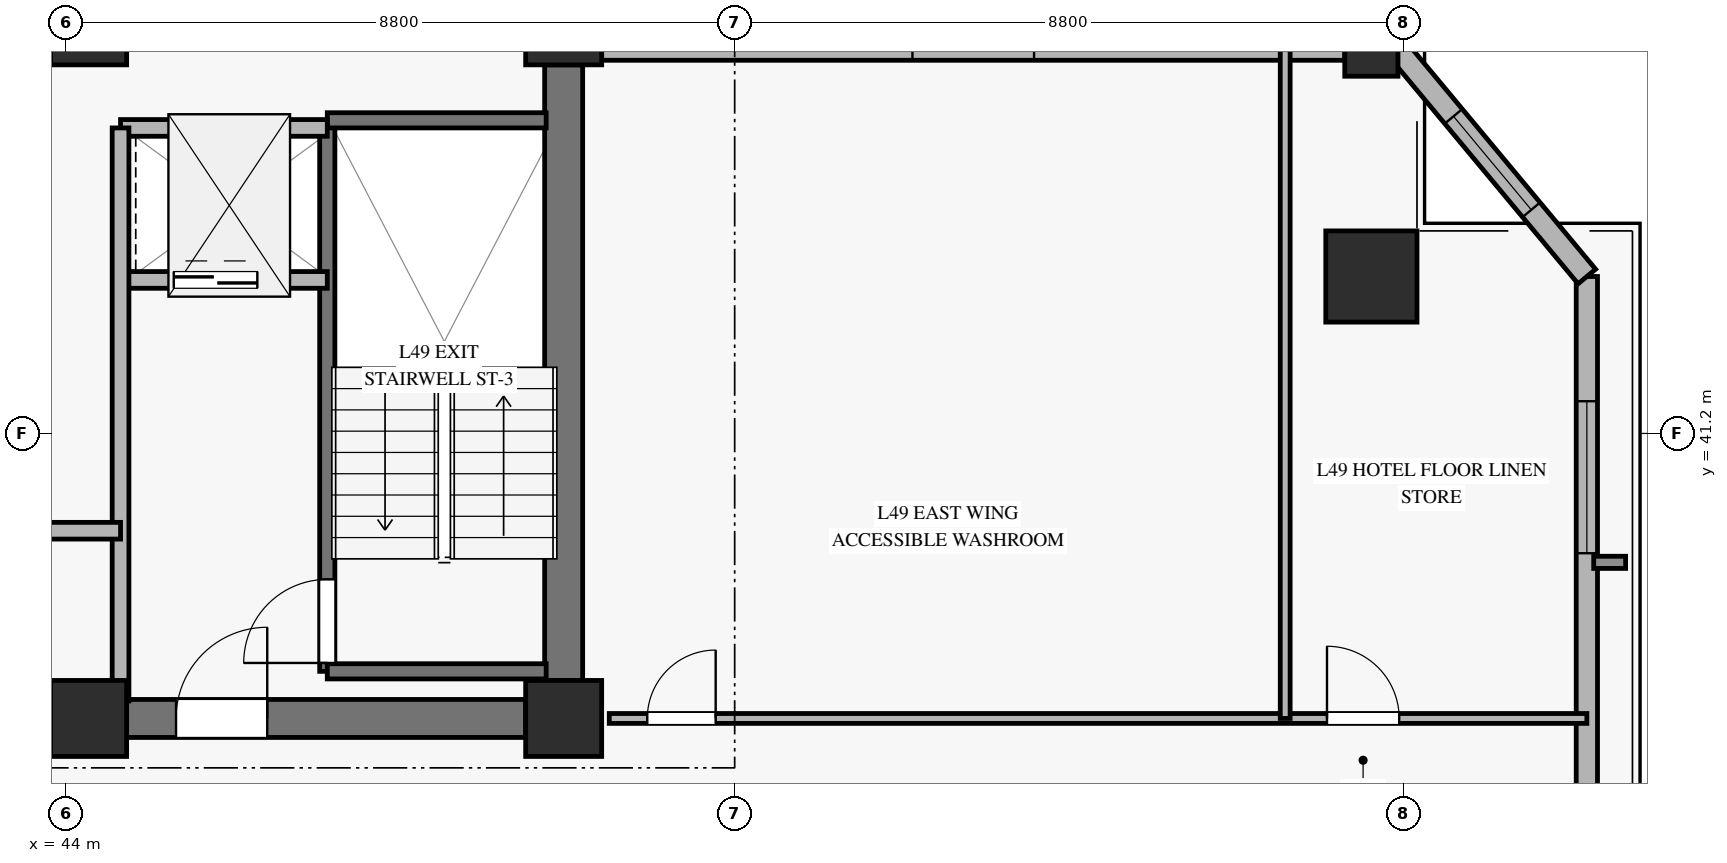
"""IFC4 building model, lengths in metres.
Left out: names, types, materials, properties, quantities, classifications, styles, units other than length and angle.
Written with IfcOpenShell. Run it as: python <this file> out.ifc"""

import sys

from ifc_helpers import new_model, si_unit, direction, frame, frame_2d, origin, origin_2d, place, context, subcontext, project, spatial, rectangle, hollow_rectangle, extrude, source, transform, mapped, element, fill, save


model = new_model("IFC4")
c1 = context("Model", 3, precision=1e-05, world=origin(), true_north=direction((0.0, 1.0)))
c2 = subcontext(c1, "Body", "Model", "MODEL_VIEW")
j1 = project(units=[si_unit("LENGTHUNIT", "METRE"), si_unit("PLANEANGLEUNIT", "RADIAN")], contexts=[c1])
p1 = place(None, origin())
s1 = spatial("IfcSite", under=j1, at=p1, CompositionType="ELEMENT")
p2 = place(p1, origin())
s2 = spatial("IfcBuilding", under=s1, at=p2, CompositionType="ELEMENT")
p3 = place(p2, frame((0.0, 0.0, 195.7)))
s3 = spatial("IfcBuildingStorey", under=s2, at=p3, CompositionType="ELEMENT", Elevation=195.7)
m1 = source(origin(), c2, "Body", "SweptSolid", [
    extrude(rectangle(XDim=1.0, YDim=1.0, at=origin_2d()), origin(), (0.0, 0.0, 1.0), 3.27),
])
for number, where, z_axis, x_axis in (
    (1, (44.3, 37.45, 0.0), (0.0, 0.0, 1.0), (1.0, 0.0, 0.0)),
    (2, (44.3, 46.55, 0.0), (0.0, 0.0, 1.0), (1.0, 0.0, 0.0)),
    (3, (50.55, 37.45, 0.0), (0.0, 0.0, 1.0), (1.0, 0.0, 0.0)),
    (4, (50.55, 46.55, 0.0), (0.0, 0.0, 1.0), (1.0, 0.0, 0.0)),
):
    element("IfcColumn", number, at=place(p3, frame(where, z_axis=z_axis, x_axis=x_axis)), inside=s3, PredefinedType="PILASTER", context=c2, shape_type="MappedRepresentation", body=[
        mapped(m1, transform((0.0, 0.0, 0.0), x_axis=(1.0, 0.0, 0.0), y_axis=(0.0, 1.0, 0.0), z_axis=(0.0, 0.0, 1.0), scale=1.0)),
    ])
p4 = place(p3, frame((44.8, 37.45, 0.0), z_axis=(0.0, 0.0, 1.0), x_axis=(1.0, 0.0, 0.0)))
e5 = element("IfcWall", 5, at=p4, inside=s3, PredefinedType="SHEAR", context=c2, shape_type="SweptSolid", body=[
    extrude(rectangle(XDim=5.25, YDim=0.5, at=frame_2d((2.625, 0.0))), origin(), (0.0, 0.0, 1.0), 3.27),
])
p5 = place(p4, frame((0.65, 0.0, 0.0)))
e6 = element("IfcOpeningElement", 6, at=p5, cuts=e5, PredefinedType="OPENING", context=c2, shape_type="SweptSolid", body=[
    extrude(rectangle(XDim=1.2, YDim=2.15, at=frame_2d((0.6, 1.075))), frame((0.0, 0.26, 0.0), z_axis=(0.0, -1.0, 0.0), x_axis=(1.0, 0.0, 0.0)), (0.0, 0.0, 1.0), 0.52),
])
p6 = place(p3, frame((50.55, 37.95, 0.0), z_axis=(0.0, 0.0, 1.0), x_axis=(0.0, 1.0, 0.0)))
e7 = element("IfcWall", 7, at=p6, inside=s3, PredefinedType="SHEAR", context=c2, shape_type="SweptSolid", body=[
    extrude(rectangle(XDim=8.1, YDim=0.5, at=frame_2d((4.05, 0.0))), origin(), (0.0, 0.0, 1.0), 3.27),
])
m2 = source(origin(), c2, "Body", "SweptSolid", [
    extrude(hollow_rectangle(XDim=1.2, YDim=1.2, WallThickness=0.055, at=origin_2d()), origin(), (0.0, 0.0, 1.0), 3.27),
])
p7 = place(p3, frame((61.177, 43.265, 0.0), z_axis=(0.0, 0.0, 1.0), x_axis=(1.0, 0.0, 0.0)))
e8 = element("IfcColumn", 8, at=p7, inside=s3, PredefinedType="COLUMN", context=c2, shape_type="MappedRepresentation", body=[
    mapped(m2, transform((0.0, 0.0, 0.0), x_axis=(1.0, 0.0, 0.0), y_axis=(0.0, 1.0, 0.0), z_axis=(0.0, 0.0, 1.0), scale=1.0)),
])
m3 = source(origin(), c2, "Body", "SweptSolid", [
    extrude(hollow_rectangle(XDim=0.7, YDim=0.7, WallThickness=0.032, at=origin_2d()), origin(), (0.0, 0.0, 1.0), 3.27),
])
p8 = place(p3, frame((61.177, 46.25, 0.0), z_axis=(0.0, 0.0, 1.0), x_axis=(1.0, 0.0, 0.0)))
e9 = element("IfcColumn", 9, at=p8, inside=s3, PredefinedType="COLUMN", context=c2, shape_type="MappedRepresentation", body=[
    mapped(m3, transform((0.0, 0.0, 0.0), x_axis=(1.0, 0.0, 0.0), y_axis=(0.0, 1.0, 0.0), z_axis=(0.0, 0.0, 1.0), scale=1.0)),
])
p9 = place(p3, frame((64.012, 28.74, 0.0), z_axis=(0.0, 0.0, 1.0), x_axis=(0.0, 1.0, 0.0)))
e10 = element("IfcWall", 10, at=p9, inside=s3, PredefinedType="SOLIDWALL", context=c2, shape_type="SweptSolid", body=[
    extrude(rectangle(XDim=14.525, YDim=0.28, at=frame_2d((7.262, 0.0))), origin(), (0.0, 0.0, 1.0), 2.75),
])
p10 = place(p9, frame((1.012, 0.0, 0.45)))
e11 = element("IfcOpeningElement", 11, at=p10, cuts=e10, PredefinedType="OPENING", context=c2, shape_type="SweptSolid", body=[
    extrude(rectangle(XDim=2.0, YDim=2.0, at=frame_2d((1.0, 1.0))), frame((0.0, 0.15, 0.0), z_axis=(0.0, -1.0, 0.0), x_axis=(1.0, 0.0, 0.0)), (0.0, 0.0, 1.0), 0.3),
])
p11 = place(p9, frame((10.884, 0.0, 0.45)))
e12 = element("IfcOpeningElement", 12, at=p11, cuts=e10, PredefinedType="OPENING", context=c2, shape_type="SweptSolid", body=[
    extrude(rectangle(XDim=2.0, YDim=2.0, at=frame_2d((1.0, 1.0))), frame((0.0, 0.15, 0.0), z_axis=(0.0, -1.0, 0.0), x_axis=(1.0, 0.0, 0.0)), (0.0, 0.0, 1.0), 0.3),
])
p12 = place(p3, frame((51.05, 46.25, 0.0), z_axis=(0.0, 0.0, 1.0), x_axis=(1.0, 0.0, 0.0)))
e13 = element("IfcWall", 13, at=p12, inside=s3, PredefinedType="SOLIDWALL", context=c2, shape_type="SweptSolid", body=[
    extrude(rectangle(XDim=9.777, YDim=0.28, at=frame_2d((4.888, 0.0))), origin(), (0.0, 0.0, 1.0), 2.75),
])
p13 = place(p12, frame((4.089, 0.0, 0.45)))
e14 = element("IfcOpeningElement", 14, at=p13, cuts=e13, PredefinedType="OPENING", context=c2, shape_type="SweptSolid", body=[
    extrude(rectangle(XDim=1.6, YDim=2.0, at=frame_2d((0.8, 1.0))), frame((0.0, 0.15, 0.0), z_axis=(0.0, -1.0, 0.0), x_axis=(1.0, 0.0, 0.0)), (0.0, 0.0, 1.0), 0.3),
])
p14 = place(p3, frame((64.012, 43.265, 0.0), z_axis=(0.0, 0.0, 1.0), x_axis=(-0.639770061202, 0.768566372403, 0.0)))
e15 = element("IfcWall", 15, at=p14, inside=s3, PredefinedType="SOLIDWALL", context=c2, shape_type="SweptSolid", body=[
    extrude(rectangle(XDim=3.884, YDim=0.3, at=frame_2d((1.942, 0.0))), origin(), (0.0, 0.0, 1.0), 2.75),
])
p15 = place(p14, frame((1.142, 0.0, 0.45)))
e16 = element("IfcOpeningElement", 16, at=p15, cuts=e15, PredefinedType="OPENING", context=c2, shape_type="SweptSolid", body=[
    extrude(rectangle(XDim=1.6, YDim=2.0, at=frame_2d((0.8, 1.0))), frame((0.0, 0.16, 0.0), z_axis=(0.0, -1.0, 0.0), x_axis=(1.0, 0.0, 0.0)), (0.0, 0.0, 1.0), 0.32),
])
p16 = place(p3, frame((47.44, 38.07, 0.0), z_axis=(0.0, 0.0, 1.0), x_axis=(0.0, 1.0, 0.0)))
e17 = element("IfcWall", 17, at=p16, inside=s3, PredefinedType="SOLIDWALL", context=c2, shape_type="SweptSolid", body=[
    extrude(rectangle(XDim=7.25, YDim=0.2, at=frame_2d((3.625, 0.0))), origin(), (0.0, 0.0, 1.0), 3.5),
])
p17 = place(p16, frame((0.11, 0.0, 0.0)))
e18 = element("IfcOpeningElement", 18, at=p17, cuts=e17, PredefinedType="OPENING", context=c2, shape_type="SweptSolid", body=[
    extrude(rectangle(XDim=1.1, YDim=2.15, at=frame_2d((0.55, 1.075))), frame((0.0, 0.11, 0.0), z_axis=(0.0, -1.0, 0.0), x_axis=(1.0, 0.0, 0.0)), (0.0, 0.0, 1.0), 0.22),
])
for number, where, z_axis, x_axis in (
    (19, (47.44, 45.32, 0.0), (0.0, 0.0, 1.0), (1.0, 0.0, 0.0)),
    (20, (47.44, 38.07, 0.0), (0.0, 0.0, 1.0), (1.0, 0.0, 0.0)),
):
    element("IfcWall", number, at=place(p3, frame(where, z_axis=z_axis, x_axis=x_axis)), inside=s3, PredefinedType="SOLIDWALL", context=c2, shape_type="SweptSolid", body=[
        extrude(rectangle(XDim=2.88, YDim=0.2, at=frame_2d((1.44, 0.0))), origin(), (0.0, 0.0, 1.0), 3.5),
    ])
p18 = place(p3, frame((44.72, 43.22, 0.0), z_axis=(0.0, 0.0, 1.0), x_axis=(1.0, 0.0, 0.0)))
e21 = element("IfcWall", 21, at=p18, inside=s3, PredefinedType="SOLIDWALL", context=c2, shape_type="SweptSolid", body=[
    extrude(rectangle(XDim=2.72, YDim=0.22, at=frame_2d((1.36, 0.0))), origin(), (0.0, 0.0, 1.0), 3.27),
])
p19 = place(p18, frame((0.7, 0.0, 0.0)))
e22 = element("IfcOpeningElement", 22, at=p19, cuts=e21, PredefinedType="OPENING", context=c2, shape_type="SweptSolid", body=[
    extrude(rectangle(XDim=1.1, YDim=2.2, at=frame_2d((0.55, 1.1))), frame((0.0, 0.12, 0.0), z_axis=(0.0, -1.0, 0.0), x_axis=(1.0, 0.0, 0.0)), (0.0, 0.0, 1.0), 0.24),
])
p20 = place(p3, frame((44.72, 45.22, 0.0), z_axis=(0.0, 0.0, 1.0), x_axis=(1.0, 0.0, 0.0)))
e23 = element("IfcWall", 23, at=p20, inside=s3, PredefinedType="SOLIDWALL", context=c2, shape_type="SweptSolid", body=[
    extrude(rectangle(XDim=2.72, YDim=0.22, at=frame_2d((1.36, 0.0))), origin(), (0.0, 0.0, 1.0), 3.27),
])
p21 = place(p3, frame((44.72, 37.68, 0.0), z_axis=(0.0, 0.0, 1.0), x_axis=(0.0, 1.0, 0.0)))
e24 = element("IfcWall", 24, at=p21, inside=s3, PredefinedType="SOLIDWALL", context=c2, shape_type="SweptSolid", body=[
    extrude(rectangle(XDim=7.54, YDim=0.22, at=frame_2d((3.77, 0.0))), origin(), (0.0, 0.0, 1.0), 3.27),
])
p22 = place(p3, frame((36.12, 39.92, 0.0), z_axis=(0.0, 0.0, 1.0), x_axis=(1.0, 0.0, 0.0)))
e25 = element("IfcWall", 25, at=p22, inside=s3, PredefinedType="SOLIDWALL", context=c2, shape_type="SweptSolid", body=[
    extrude(rectangle(XDim=8.6, YDim=0.22, at=frame_2d((4.3, 0.0))), origin(), (0.0, 0.0, 1.0), 2.555),
])
p23 = place(p3, frame((51.15, 37.45, 0.0), z_axis=(0.0, 0.0, 1.0), x_axis=(1.0, 0.0, 0.0)))
e26 = element("IfcWall", 26, at=p23, inside=s3, PredefinedType="PARTITIONING", context=c2, shape_type="SweptSolid", body=[
    extrude(rectangle(XDim=12.862, YDim=0.13, at=frame_2d((6.431, 0.0))), origin(), (0.0, 0.0, 1.0), 2.755),
])
p24 = place(p23, frame((0.5, 0.0, 0.0)))
e27 = element("IfcOpeningElement", 27, at=p24, cuts=e26, PredefinedType="OPENING", context=c2, shape_type="SweptSolid", body=[
    extrude(rectangle(XDim=0.9, YDim=2.1, at=frame_2d((0.45, 1.05))), frame((0.0, 0.075, 0.0), z_axis=(0.0, -1.0, 0.0), x_axis=(1.0, 0.0, 0.0)), (0.0, 0.0, 1.0), 0.15),
])
p25 = place(p23, frame((9.443, 0.0, 0.0)))
e28 = element("IfcOpeningElement", 28, at=p25, cuts=e26, PredefinedType="OPENING", context=c2, shape_type="SweptSolid", body=[
    extrude(rectangle(XDim=0.95, YDim=2.1, at=frame_2d((0.475, 1.05))), frame((0.0, 0.075, 0.0), z_axis=(0.0, -1.0, 0.0), x_axis=(1.0, 0.0, 0.0)), (0.0, 0.0, 1.0), 0.15),
])
p26 = place(p3, frame((60.043, 37.45, 0.0), z_axis=(0.0, 0.0, 1.0), x_axis=(0.0, 1.0, 0.0)))
e29 = element("IfcWall", 29, at=p26, inside=s3, PredefinedType="PARTITIONING", context=c2, shape_type="SweptSolid", body=[
    extrude(rectangle(XDim=8.8, YDim=0.13, at=frame_2d((4.4, 0.0))), origin(), (0.0, 0.0, 1.0), 2.755),
])
m4 = source(origin(), c2, "Body", "SweptSolid", [
    extrude(rectangle(XDim=2.0, YDim=2.0, at=frame_2d((1.0, 1.0))), frame((0.0, 0.03, 0.0), z_axis=(0.0, -1.0, 0.0), x_axis=(1.0, 0.0, 0.0)), (0.0, 0.0, 1.0), 0.06),
])
p27 = place(p11, origin())
e30 = element("IfcWindow", 30, at=p27, inside=s3, PartitioningType="SINGLE_PANEL", PredefinedType="WINDOW", context=c2, shape_type="MappedRepresentation", body=[
    mapped(m4, transform((0.0, 0.0, 0.0), x_axis=(1.0, 0.0, 0.0), y_axis=(0.0, 1.0, 0.0), z_axis=(0.0, 0.0, 1.0), scale=1.0)),
])
fill(e12, e30)
m5 = source(origin(), c2, "Body", "SweptSolid", [
    extrude(rectangle(XDim=1.6, YDim=2.0, at=frame_2d((0.8, 1.0))), frame((0.0, 0.03, 0.0), z_axis=(0.0, -1.0, 0.0), x_axis=(1.0, 0.0, 0.0)), (0.0, 0.0, 1.0), 0.06),
])
p28 = place(p15, origin())
e31 = element("IfcWindow", 31, at=p28, inside=s3, PartitioningType="SINGLE_PANEL", PredefinedType="WINDOW", context=c2, shape_type="MappedRepresentation", body=[
    mapped(m5, transform((0.0, 0.0, 0.0), x_axis=(1.0, 0.0, 0.0), y_axis=(0.0, 1.0, 0.0), z_axis=(0.0, 0.0, 1.0), scale=1.0)),
])
fill(e16, e31)
m6 = source(origin(), c2, "Body", "SweptSolid", [
    extrude(rectangle(XDim=1.1, YDim=2.15, at=frame_2d((0.55, 1.075))), frame((0.0, 0.025, 0.0), z_axis=(0.0, -1.0, 0.0), x_axis=(1.0, 0.0, 0.0)), (0.0, 0.0, 1.0), 0.05),
])
p29 = place(p17, origin())
e32 = element("IfcDoor", 32, at=p29, inside=s3, OperationType="SINGLE_SWING_LEFT", PredefinedType="DOOR", context=c2, shape_type="MappedRepresentation", body=[
    mapped(m6, transform((0.0, 0.0, 0.0), x_axis=(1.0, 0.0, 0.0), y_axis=(0.0, 1.0, 0.0), z_axis=(0.0, 0.0, 1.0), scale=1.0)),
])
fill(e18, e32)
m7 = source(origin(), c2, "Body", "SweptSolid", [
    extrude(rectangle(XDim=1.1, YDim=2.2, at=frame_2d((0.55, 1.1))), frame((0.0, 0.025, 0.0), z_axis=(0.0, -1.0, 0.0), x_axis=(1.0, 0.0, 0.0)), (0.0, 0.0, 1.0), 0.05),
])
p30 = place(p19, origin())
e33 = element("IfcDoor", 33, at=p30, inside=s3, OperationType="SLIDING_TO_LEFT", PredefinedType="DOOR", context=c2, shape_type="MappedRepresentation", body=[
    mapped(m7, transform((0.0, 0.0, 0.0), x_axis=(1.0, 0.0, 0.0), y_axis=(0.0, 1.0, 0.0), z_axis=(0.0, 0.0, 1.0), scale=1.0)),
])
fill(e22, e33)
m8 = source(origin(), c2, "Body", "SweptSolid", [
    extrude(rectangle(XDim=1.2, YDim=2.15, at=frame_2d((0.6, 1.075))), frame((0.0, 0.025, 0.0), z_axis=(0.0, -1.0, 0.0), x_axis=(1.0, 0.0, 0.0)), (0.0, 0.0, 1.0), 0.05),
])
p31 = place(p5, origin())
e34 = element("IfcDoor", 34, at=p31, inside=s3, OperationType="SINGLE_SWING_RIGHT", PredefinedType="DOOR", context=c2, shape_type="MappedRepresentation", body=[
    mapped(m8, transform((0.0, 0.0, 0.0), x_axis=(1.0, 0.0, 0.0), y_axis=(0.0, 1.0, 0.0), z_axis=(0.0, 0.0, 1.0), scale=1.0)),
])
fill(e6, e34)
m9 = source(origin(), c2, "Body", "SweptSolid", [
    extrude(rectangle(XDim=0.9, YDim=2.1, at=frame_2d((0.45, 1.05))), frame((0.0, 0.025, 0.0), z_axis=(0.0, -1.0, 0.0), x_axis=(1.0, 0.0, 0.0)), (0.0, 0.0, 1.0), 0.05),
])
p32 = place(p24, origin())
e35 = element("IfcDoor", 35, at=p32, inside=s3, OperationType="SINGLE_SWING_RIGHT", PredefinedType="DOOR", context=c2, shape_type="MappedRepresentation", body=[
    mapped(m9, transform((0.0, 0.0, 0.0), x_axis=(1.0, 0.0, 0.0), y_axis=(0.0, 1.0, 0.0), z_axis=(0.0, 0.0, 1.0), scale=1.0)),
])
fill(e27, e35)
m10 = source(origin(), c2, "Body", "SweptSolid", [
    extrude(rectangle(XDim=0.95, YDim=2.1, at=frame_2d((0.475, 1.05))), frame((0.0, 0.025, 0.0), z_axis=(0.0, -1.0, 0.0), x_axis=(1.0, 0.0, 0.0)), (0.0, 0.0, 1.0), 0.05),
])
p33 = place(p25, origin())
e36 = element("IfcDoor", 36, at=p33, inside=s3, OperationType="SINGLE_SWING_LEFT", PredefinedType="DOOR", context=c2, shape_type="MappedRepresentation", body=[
    mapped(m10, transform((0.0, 0.0, 0.0), x_axis=(1.0, 0.0, 0.0), y_axis=(0.0, 1.0, 0.0), z_axis=(0.0, 0.0, 1.0), scale=1.0)),
])
fill(e28, e36)
save(model, sys.argv[1])
